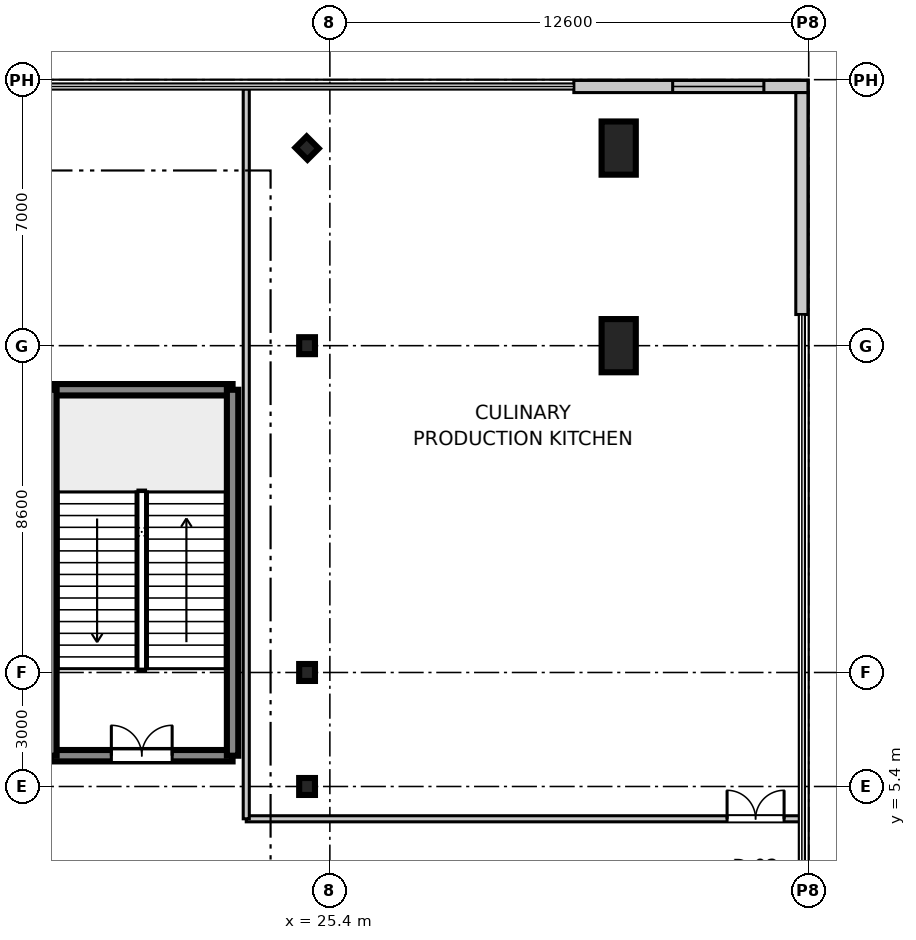
"""IFC4 building model, lengths in metres.
Left out: names, types, materials, properties, quantities, classifications, styles, units other than length and angle.
Written with IfcOpenShell. Run it as: python <this file> out.ifc"""

import sys

from ifc_helpers import new_model, si_unit, direction, frame, frame_2d, origin, origin_2d, place, context, subcontext, project, spatial, rectangle, i_section, extrude, source, transform, mapped, element, fill, save


model = new_model("IFC4")
c1 = context("Model", 3, precision=1e-05, world=origin(), true_north=direction((0.0, 1.0)))
c2 = subcontext(c1, "Body", "Model", "MODEL_VIEW")
j1 = project(units=[si_unit("LENGTHUNIT", "METRE"), si_unit("PLANEANGLEUNIT", "RADIAN")], contexts=[c1])
p1 = place(None, origin())
s1 = spatial("IfcSite", under=j1, at=p1, CompositionType="ELEMENT")
p2 = place(p1, origin())
s2 = spatial("IfcBuilding", under=s1, at=p2, CompositionType="ELEMENT")
p3 = place(p2, frame((0.0, 0.0, 5.4)))
s3 = spatial("IfcBuildingStorey", under=s2, at=p3, CompositionType="ELEMENT", Elevation=5.4)
m1 = source(origin(), c2, "Body", "SweptSolid", [
    extrude(rectangle(XDim=0.9, YDim=1.4, at=origin_2d()), origin(), (0.0, 0.0, 1.0), 5.355),
])
for number, where, z_axis, x_axis in (
    (1, (33.0, 17.0, 0.0), (0.0, 0.0, 1.0), (1.0, 0.0, 0.0)),
    (2, (33.0, 22.2, 0.0), (0.0, 0.0, 1.0), (1.0, 0.0, 0.0)),
):
    element("IfcColumn", number, at=place(p3, frame(where, z_axis=z_axis, x_axis=x_axis)), inside=s3, PredefinedType="PILASTER", context=c2, shape_type="MappedRepresentation", body=[
        mapped(m1, transform((0.0, 0.0, 0.0), scale=1.0)),
    ])
m2 = source(origin(), c2, "Body", "SweptSolid", [
    extrude(i_section(OverallWidth=0.416, OverallDepth=0.446, WebThickness=0.025, FlangeThickness=0.04, at=origin_2d()), origin(), (0.0, 0.0, 1.0), 5.355),
])
for number, where, z_axis, x_axis in (
    (3, (24.8, 5.4, 0.0), (0.0, 0.0, 1.0), (1.0, 0.0, 0.0)),
    (4, (24.8, 8.4, 0.0), (0.0, 0.0, 1.0), (1.0, 0.0, 0.0)),
    (5, (24.8, 17.0, 0.0), (0.0, 0.0, 1.0), (1.0, 0.0, 0.0)),
    (6, (24.8, 22.2, 0.0), (0.0, 0.0, 1.0), (0.707, 0.707, 0.0)),
):
    element("IfcColumn", number, at=place(p3, frame(where, z_axis=z_axis, x_axis=x_axis)), inside=s3, PredefinedType="COLUMN", context=c2, shape_type="MappedRepresentation", body=[
        mapped(m2, transform((0.0, 0.0, 0.0), scale=1.0)),
    ])
m3 = source(origin(), c2, "Body", "SweptSolid", [
    extrude(rectangle(XDim=4.78, YDim=0.3, at=frame_2d((2.39, 0.0))), origin(), (0.0, 0.0, 1.0), 5.08),
])
p4 = place(p3, frame((18.06, 6.21, 0.0), z_axis=(0.0, 0.0, 1.0), x_axis=(1.0, 0.0, 0.0)))
e7 = element("IfcWall", 7, at=p4, inside=s3, PredefinedType="SHEAR", context=c2, shape_type="MappedRepresentation", body=[
    mapped(m3, transform((0.0, 0.0, 0.0), scale=1.0)),
])
p5 = place(p4, frame((1.59, 0.0, 0.0)))
e8 = element("IfcOpeningElement", 8, at=p5, cuts=e7, PredefinedType="OPENING", context=c2, shape_type="SweptSolid", body=[
    extrude(rectangle(XDim=1.6, YDim=2.2, at=frame_2d((0.8, 1.1))), frame((0.0, 0.16, 0.0), z_axis=(0.0, -1.0, 0.0), x_axis=(1.0, 0.0, 0.0)), (0.0, 0.0, 1.0), 0.32),
])
p6 = place(p3, frame((18.06, 15.84, 0.0), z_axis=(0.0, 0.0, 1.0), x_axis=(1.0, 0.0, 0.0)))
e9 = element("IfcWall", 9, at=p6, inside=s3, PredefinedType="SHEAR", context=c2, shape_type="MappedRepresentation", body=[
    mapped(m3, transform((0.0, 0.0, 0.0), scale=1.0)),
])
m4 = source(origin(), c2, "Body", "SweptSolid", [
    extrude(rectangle(XDim=9.63, YDim=0.3, at=frame_2d((4.815, 0.0))), origin(), (0.0, 0.0, 1.0), 5.08),
])
for number, where, z_axis, x_axis in (
    (10, (18.06, 6.21, 0.0), (0.0, 0.0, 1.0), (0.0, 1.0, 0.0)),
    (11, (22.84, 6.21, 0.0), (0.0, 0.0, 1.0), (0.0, 1.0, 0.0)),
):
    element("IfcWall", number, at=place(p3, frame(where, z_axis=z_axis, x_axis=x_axis)), inside=s3, PredefinedType="SHEAR", context=c2, shape_type="MappedRepresentation", body=[
        mapped(m4, transform((0.0, 0.0, 0.0), scale=1.0)),
    ])
m5 = source(origin(), c2, "Body", "SweptSolid", [
    extrude(rectangle(XDim=6.16, YDim=0.32, at=frame_2d((3.08, 0.0))), origin(), (0.0, 0.0, 1.0), 5.08),
])
p7 = place(p3, frame((31.82, 23.82, 0.0), z_axis=(0.0, 0.0, 1.0), x_axis=(1.0, 0.0, 0.0)))
e12 = element("IfcWall", 12, at=p7, inside=s3, PredefinedType="STANDARD", context=c2, shape_type="MappedRepresentation", body=[
    mapped(m5, transform((0.0, 0.0, 0.0), scale=1.0)),
])
p8 = place(p7, frame((2.6, 0.0, 0.9)))
e13 = element("IfcOpeningElement", 13, at=p8, cuts=e12, PredefinedType="OPENING", context=c2, shape_type="SweptSolid", body=[
    extrude(rectangle(XDim=2.4, YDim=2.2, at=frame_2d((1.2, 1.1))), frame((0.0, 0.17, 0.0), z_axis=(0.0, -1.0, 0.0), x_axis=(1.0, 0.0, 0.0)), (0.0, 0.0, 1.0), 0.34),
])
m6 = source(origin(), c2, "Body", "SweptSolid", [
    extrude(rectangle(XDim=5.84, YDim=0.32, at=frame_2d((2.92, 0.0))), origin(), (0.0, 0.0, 1.0), 5.08),
])
p9 = place(p3, frame((37.82, 17.82, 0.0), z_axis=(0.0, 0.0, 1.0), x_axis=(0.0, 1.0, 0.0)))
e14 = element("IfcWall", 14, at=p9, inside=s3, PredefinedType="STANDARD", context=c2, shape_type="MappedRepresentation", body=[
    mapped(m6, transform((0.0, 0.0, 0.0), scale=1.0)),
])
m7 = source(origin(), c2, "Body", "SweptSolid", [
    extrude(rectangle(XDim=14.56, YDim=0.16, at=frame_2d((7.28, 0.0))), origin(), (0.0, 0.0, 1.0), 3.4),
])
p10 = place(p3, frame((23.2, 4.55, 0.0), z_axis=(0.0, 0.0, 1.0), x_axis=(1.0, 0.0, 0.0)))
e15 = element("IfcWall", 15, at=p10, inside=s3, PredefinedType="PARTITIONING", context=c2, shape_type="MappedRepresentation", body=[
    mapped(m7, transform((0.0, 0.0, 0.0), scale=1.0)),
])
p11 = place(p10, frame((12.652, 0.0, 0.0)))
e16 = element("IfcOpeningElement", 16, at=p11, cuts=e15, PredefinedType="OPENING", context=c2, shape_type="SweptSolid", body=[
    extrude(rectangle(XDim=1.5, YDim=2.15, at=frame_2d((0.75, 1.075))), frame((0.0, 0.09, 0.0), z_axis=(0.0, -1.0, 0.0), x_axis=(1.0, 0.0, 0.0)), (0.0, 0.0, 1.0), 0.18),
])
m8 = source(origin(), c2, "Body", "SweptSolid", [
    extrude(rectangle(XDim=19.21, YDim=0.16, at=frame_2d((9.605, 0.0))), origin(), (0.0, 0.0, 1.0), 3.4),
])
p12 = place(p3, frame((23.2, 4.55, 0.0), z_axis=(0.0, 0.0, 1.0), x_axis=(0.0, 1.0, 0.0)))
e17 = element("IfcWall", 17, at=p12, inside=s3, PredefinedType="PARTITIONING", context=c2, shape_type="MappedRepresentation", body=[
    mapped(m8, transform((0.0, 0.0, 0.0), scale=1.0)),
])
m9 = source(origin(), c2, "Body", "SweptSolid", [
    extrude(rectangle(XDim=1.6, YDim=2.2, at=frame_2d((0.8, 1.1))), frame((0.0, 0.025, 0.0), z_axis=(0.0, -1.0, 0.0), x_axis=(1.0, 0.0, 0.0)), (0.0, 0.0, 1.0), 0.05),
])
p13 = place(p5, origin())
e18 = element("IfcDoor", 18, at=p13, inside=s3, OperationType="DOUBLE_DOOR_SINGLE_SWING", PredefinedType="DOOR", context=c2, shape_type="MappedRepresentation", body=[
    mapped(m9, transform((0.0, 0.0, 0.0), scale=1.0)),
])
fill(e8, e18)
m10 = source(origin(), c2, "Body", "SweptSolid", [
    extrude(rectangle(XDim=2.4, YDim=2.2, at=frame_2d((1.2, 1.1))), frame((0.0, 0.03, 0.0), z_axis=(0.0, -1.0, 0.0), x_axis=(1.0, 0.0, 0.0)), (0.0, 0.0, 1.0), 0.06),
])
p14 = place(p8, origin())
e19 = element("IfcWindow", 19, at=p14, inside=s3, PartitioningType="SINGLE_PANEL", PredefinedType="WINDOW", context=c2, shape_type="MappedRepresentation", body=[
    mapped(m10, transform((0.0, 0.0, 0.0), scale=1.0)),
])
fill(e13, e19)
m11 = source(origin(), c2, "Body", "SweptSolid", [
    extrude(rectangle(XDim=1.5, YDim=2.15, at=frame_2d((0.75, 1.075))), frame((0.0, 0.025, 0.0), z_axis=(0.0, -1.0, 0.0), x_axis=(1.0, 0.0, 0.0)), (0.0, 0.0, 1.0), 0.05),
])
p15 = place(p11, origin())
e20 = element("IfcDoor", 20, at=p15, inside=s3, OperationType="DOUBLE_DOOR_SINGLE_SWING", PredefinedType="DOOR", context=c2, shape_type="MappedRepresentation", body=[
    mapped(m11, transform((0.0, 0.0, 0.0), scale=1.0)),
])
fill(e16, e20)
save(model, sys.argv[1])
